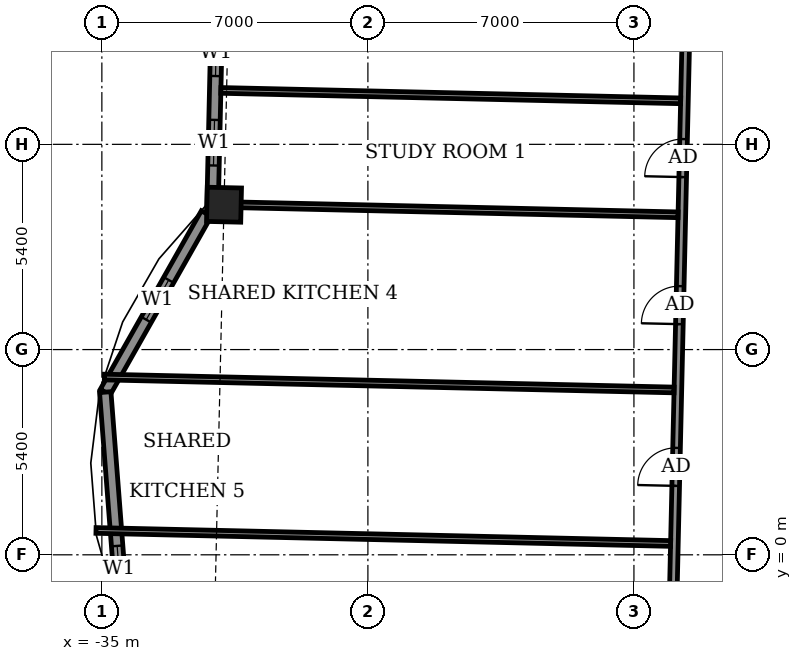
"""IFC4 building model, lengths in metres.
Left out: names, types, materials, properties, quantities, classifications, styles, units other than length and angle.
Written with IfcOpenShell. Run it as: python <this file> out.ifc"""

import sys

from ifc_helpers import new_model, si_unit, direction, frame, frame_2d, origin, origin_2d, place, context, subcontext, project, spatial, rectangle, extrude, element, fill, save


model = new_model("IFC4")
c1 = context("Model", 3, precision=1e-05, world=origin(), true_north=direction((0.0, 1.0)))
c2 = subcontext(c1, "Body", "Model", "MODEL_VIEW")
j1 = project(units=[si_unit("LENGTHUNIT", "METRE"), si_unit("PLANEANGLEUNIT", "RADIAN")], contexts=[c1])
p1 = place(None, origin())
s1 = spatial("IfcSite", under=j1, at=p1, CompositionType="ELEMENT")
p2 = place(p1, origin())
s2 = spatial("IfcBuilding", under=s1, at=p2, CompositionType="ELEMENT")
p3 = place(p2, frame((0.0, 0.0, 313.3)))
s3 = spatial("IfcBuildingStorey", under=s2, at=p3, CompositionType="ELEMENT", Elevation=313.3)
p4 = place(p3, frame((-31.786, 9.212, -0.55), z_axis=(0.0, 0.0, 1.0), x_axis=(-0.022680668131, -0.999742760561, 0.0)))
e1 = element("IfcColumn", 1, at=p4, inside=s3, PredefinedType="COLUMN", context=c2, shape_type="SweptSolid", body=[
    extrude(rectangle(XDim=0.9, YDim=0.9, at=origin_2d()), origin(), (0.0, 0.0, 1.0), 3.6),
])
p5 = place(p3, frame((-31.735, 24.69, 0.0), z_axis=(0.0, 0.0, 1.0), x_axis=(-0.022694199758, -0.999742453484, 0.0)))
e2 = element("IfcWall", 2, at=p5, inside=s3, PredefinedType="SOLIDWALL", context=c2, shape_type="SweptSolid", body=[
    extrude(rectangle(XDim=15.9, YDim=0.3, at=frame_2d((7.95, 0.0))), origin(), (0.0, 0.0, 1.0), 2.55),
])
p6 = place(p5, frame((1.953, 0.0, 0.0)))
e3 = element("IfcOpeningElement", 3, at=p6, cuts=e2, PredefinedType="OPENING", context=c2, shape_type="SweptSolid", body=[
    extrude(rectangle(XDim=1.5, YDim=2.4, at=frame_2d((0.75, 1.2))), frame((0.0, 0.16, 0.0), z_axis=(0.0, -1.0, 0.0), x_axis=(1.0, 0.0, 0.0)), (0.0, 0.0, 1.0), 0.32),
])
p7 = place(p5, frame((10.896, 0.0, 0.9)))
e4 = element("IfcOpeningElement", 4, at=p7, cuts=e2, PredefinedType="OPENING", context=c2, shape_type="SweptSolid", body=[
    extrude(rectangle(XDim=1.2, YDim=1.5, at=frame_2d((0.6, 0.75))), frame((0.0, 0.16, 0.0), z_axis=(0.0, -1.0, 0.0), x_axis=(1.0, 0.0, 0.0)), (0.0, 0.0, 1.0), 0.32),
])
p8 = place(p5, frame((13.25, 0.0, 0.9)))
e5 = element("IfcOpeningElement", 5, at=p8, cuts=e2, PredefinedType="OPENING", context=c2, shape_type="SweptSolid", body=[
    extrude(rectangle(XDim=1.2, YDim=1.5, at=frame_2d((0.6, 0.75))), frame((0.0, 0.16, 0.0), z_axis=(0.0, -1.0, 0.0), x_axis=(1.0, 0.0, 0.0)), (0.0, 0.0, 1.0), 0.32),
])
p9 = place(p3, frame((-32.252, 8.978, 0.0), z_axis=(0.0, 0.0, 1.0), x_axis=(-0.492554919955, -0.870281363025, 0.0)))
e6 = element("IfcWall", 6, at=p9, inside=s3, PredefinedType="SOLIDWALL", context=c2, shape_type="SweptSolid", body=[
    extrude(rectangle(XDim=5.398, YDim=0.3, at=frame_2d((2.699, 0.0))), origin(), (0.0, 0.0, 1.0), 3.05),
])
p10 = place(p9, frame((2.008, 0.0, 0.9)))
e7 = element("IfcOpeningElement", 7, at=p10, cuts=e6, PredefinedType="OPENING", context=c2, shape_type="SweptSolid", body=[
    extrude(rectangle(XDim=1.2, YDim=1.5, at=frame_2d((0.6, 0.75))), frame((0.0, 0.16, 0.0), z_axis=(0.0, -1.0, 0.0), x_axis=(1.0, 0.0, 0.0)), (0.0, 0.0, 1.0), 0.32),
])
p11 = place(p3, frame((-34.911, 4.28, 0.0), z_axis=(0.0, 0.0, 1.0), x_axis=(0.077135284219, -0.997020635658, 0.0)))
e8 = element("IfcWall", 8, at=p11, inside=s3, PredefinedType="SOLIDWALL", context=c2, shape_type="SweptSolid", body=[
    extrude(rectangle(XDim=5.574, YDim=0.3, at=frame_2d((2.787, 0.0))), origin(), (0.0, 0.0, 1.0), 3.05),
])
p12 = place(p11, frame((4.058, 0.0, 0.9)))
e9 = element("IfcOpeningElement", 9, at=p12, cuts=e8, PredefinedType="OPENING", context=c2, shape_type="SweptSolid", body=[
    extrude(rectangle(XDim=1.2, YDim=1.5, at=frame_2d((0.6, 0.75))), frame((0.0, 0.16, 0.0), z_axis=(0.0, -1.0, 0.0), x_axis=(1.0, 0.0, 0.0)), (0.0, 0.0, 1.0), 0.32),
])
p13 = place(p3, frame((-34.78, 12.406, 0.0), z_axis=(0.0, 0.0, 1.0), x_axis=(0.022828630714, 0.999739392852, 0.0)))
e10 = element("IfcWall", 10, at=p13, inside=s3, PredefinedType="USERDEFINED", context=c2, shape_type="SweptSolid", body=[
    extrude(rectangle(XDim=6.0, YDim=0.55, at=frame_2d((3.0, 0.0))), origin(), (0.0, 0.0, 1.0), 0.8),
])
p14 = place(p3, frame((-20.216, -12.081, 0.0), z_axis=(0.0, 0.0, 1.0), x_axis=(0.02267447203, 0.999742901109, 0.0)))
e11 = element("IfcWall", 11, at=p14, inside=s3, PredefinedType="PARTITIONING", context=c2, shape_type="SweptSolid", body=[
    extrude(rectangle(XDim=27.65, YDim=0.2, at=frame_2d((13.825, 0.0))), origin(), (0.0, 0.0, 1.0), 3.05),
])
p15 = place(p14, frame((22.025, 0.0, 0.0)))
e12 = element("IfcOpeningElement", 12, at=p15, cuts=e11, PredefinedType="OPENING", context=c2, shape_type="SweptSolid", body=[
    extrude(rectangle(XDim=1.0, YDim=2.1, at=frame_2d((0.5, 1.05))), frame((0.0, 0.11, 0.0), z_axis=(0.0, -1.0, 0.0), x_axis=(1.0, 0.0, 0.0)), (0.0, 0.0, 1.0), 0.22),
])
p16 = place(p14, frame((18.155, 0.0, 0.0)))
e13 = element("IfcOpeningElement", 13, at=p16, cuts=e11, PredefinedType="OPENING", context=c2, shape_type="SweptSolid", body=[
    extrude(rectangle(XDim=1.0, YDim=2.1, at=frame_2d((0.5, 1.05))), frame((0.0, 0.11, 0.0), z_axis=(0.0, -1.0, 0.0), x_axis=(1.0, 0.0, 0.0)), (0.0, 0.0, 1.0), 0.22),
])
p17 = place(p14, frame((13.898, 0.0, 0.0)))
e14 = element("IfcOpeningElement", 14, at=p17, cuts=e11, PredefinedType="OPENING", context=c2, shape_type="SweptSolid", body=[
    extrude(rectangle(XDim=1.0, YDim=2.1, at=frame_2d((0.5, 1.05))), frame((0.0, 0.11, 0.0), z_axis=(0.0, -1.0, 0.0), x_axis=(1.0, 0.0, 0.0)), (0.0, 0.0, 1.0), 0.22),
])
p18 = place(p14, frame((9.405, 0.0, 0.0)))
e15 = element("IfcOpeningElement", 15, at=p18, cuts=e11, PredefinedType="OPENING", context=c2, shape_type="SweptSolid", body=[
    extrude(rectangle(XDim=1.0, YDim=2.1, at=frame_2d((0.5, 1.05))), frame((0.0, 0.11, 0.0), z_axis=(0.0, -1.0, 0.0), x_axis=(1.0, 0.0, 0.0)), (0.0, 0.0, 1.0), 0.22),
])
p19 = place(p14, frame((5.837, 0.0, 0.0)))
e16 = element("IfcOpeningElement", 16, at=p19, cuts=e11, PredefinedType="OPENING", context=c2, shape_type="SweptSolid", body=[
    extrude(rectangle(XDim=1.0, YDim=2.1, at=frame_2d((0.5, 1.05))), frame((0.0, 0.11, 0.0), z_axis=(0.0, -1.0, 0.0), x_axis=(1.0, 0.0, 0.0)), (0.0, 0.0, 1.0), 0.22),
])
p20 = place(p14, frame((3.75, 0.0, 0.0)))
e17 = element("IfcOpeningElement", 17, at=p20, cuts=e11, PredefinedType="OPENING", context=c2, shape_type="SweptSolid", body=[
    extrude(rectangle(XDim=0.9, YDim=2.1, at=frame_2d((0.45, 1.05))), frame((0.0, 0.11, 0.0), z_axis=(0.0, -1.0, 0.0), x_axis=(1.0, 0.0, 0.0)), (0.0, 0.0, 1.0), 0.22),
])
p21 = place(p3, frame((-35.154, 0.641, 0.0), z_axis=(0.0, 0.0, 1.0), x_axis=(0.99974273487, -0.022681800518, 0.0)))
e18 = element("IfcWall", 18, at=p21, inside=s3, PredefinedType="PARTITIONING", context=c2, shape_type="SweptSolid", body=[
    extrude(rectangle(XDim=15.123, YDim=0.15, at=frame_2d((7.562, 0.0))), origin(), (0.0, 0.0, 1.0), 2.05),
])
p22 = place(p3, frame((-34.934, 4.677, 0.0), z_axis=(0.0, 0.0, 1.0), x_axis=(0.99974273422, -0.022681829163, 0.0)))
e19 = element("IfcWall", 19, at=p22, inside=s3, PredefinedType="PARTITIONING", context=c2, shape_type="SweptSolid", body=[
    extrude(rectangle(XDim=14.994, YDim=0.15, at=frame_2d((7.497, 0.0))), origin(), (0.0, 0.0, 1.0), 2.05),
])
p23 = place(p3, frame((-31.936, 9.22, 0.0), z_axis=(0.0, 0.0, 1.0), x_axis=(0.9997437175, -0.02263844782, 0.0)))
e20 = element("IfcWall", 20, at=p23, inside=s3, PredefinedType="PARTITIONING", context=c2, shape_type="SweptSolid", body=[
    extrude(rectangle(XDim=12.1, YDim=0.15, at=frame_2d((6.05, 0.0))), origin(), (0.0, 0.0, 1.0), 3.05),
])
p24 = place(p3, frame((-31.868, 12.219, 0.0), z_axis=(0.0, 0.0, 1.0), x_axis=(0.9997437175, -0.02263844782, 0.0)))
e21 = element("IfcWall", 21, at=p24, inside=s3, PredefinedType="PARTITIONING", context=c2, shape_type="SweptSolid", body=[
    extrude(rectangle(XDim=12.1, YDim=0.15, at=frame_2d((6.05, 0.0))), origin(), (0.0, 0.0, 1.0), 2.55),
])
p25 = place(p7, origin())
e22 = element("IfcWindow", 22, at=p25, inside=s3, PartitioningType="SINGLE_PANEL", PredefinedType="WINDOW", context=c2, shape_type="SweptSolid", body=[
    extrude(rectangle(XDim=1.2, YDim=1.5, at=frame_2d((0.6, 0.75))), frame((0.0, 0.03, 0.0), z_axis=(0.0, -1.0, 0.0), x_axis=(1.0, 0.0, 0.0)), (0.0, 0.0, 1.0), 0.06),
])
fill(e4, e22)
p26 = place(p8, origin())
e23 = element("IfcWindow", 23, at=p26, inside=s3, PartitioningType="SINGLE_PANEL", PredefinedType="WINDOW", context=c2, shape_type="SweptSolid", body=[
    extrude(rectangle(XDim=1.2, YDim=1.5, at=frame_2d((0.6, 0.75))), frame((0.0, 0.03, 0.0), z_axis=(0.0, -1.0, 0.0), x_axis=(1.0, 0.0, 0.0)), (0.0, 0.0, 1.0), 0.06),
])
fill(e5, e23)
p27 = place(p10, origin())
e24 = element("IfcWindow", 24, at=p27, inside=s3, PartitioningType="SINGLE_PANEL", PredefinedType="WINDOW", context=c2, shape_type="SweptSolid", body=[
    extrude(rectangle(XDim=1.2, YDim=1.5, at=frame_2d((0.6, 0.75))), frame((0.0, 0.03, 0.0), z_axis=(0.0, -1.0, 0.0), x_axis=(1.0, 0.0, 0.0)), (0.0, 0.0, 1.0), 0.06),
])
fill(e7, e24)
p28 = place(p12, origin())
e25 = element("IfcWindow", 25, at=p28, inside=s3, PartitioningType="SINGLE_PANEL", PredefinedType="WINDOW", context=c2, shape_type="SweptSolid", body=[
    extrude(rectangle(XDim=1.2, YDim=1.5, at=frame_2d((0.6, 0.75))), frame((0.0, 0.03, 0.0), z_axis=(0.0, -1.0, 0.0), x_axis=(1.0, 0.0, 0.0)), (0.0, 0.0, 1.0), 0.06),
])
fill(e9, e25)
p29 = place(p15, origin())
e26 = element("IfcDoor", 26, at=p29, inside=s3, OperationType="SINGLE_SWING_RIGHT", PredefinedType="DOOR", context=c2, shape_type="SweptSolid", body=[
    extrude(rectangle(XDim=1.0, YDim=2.1, at=frame_2d((0.5, 1.05))), frame((0.0, 0.025, 0.0), z_axis=(0.0, -1.0, 0.0), x_axis=(1.0, 0.0, 0.0)), (0.0, 0.0, 1.0), 0.05),
])
fill(e12, e26)
p30 = place(p16, origin())
e27 = element("IfcDoor", 27, at=p30, inside=s3, OperationType="SINGLE_SWING_LEFT", PredefinedType="DOOR", context=c2, shape_type="SweptSolid", body=[
    extrude(rectangle(XDim=1.0, YDim=2.1, at=frame_2d((0.5, 1.05))), frame((0.0, 0.025, 0.0), z_axis=(0.0, -1.0, 0.0), x_axis=(1.0, 0.0, 0.0)), (0.0, 0.0, 1.0), 0.05),
])
fill(e13, e27)
p31 = place(p17, origin())
e28 = element("IfcDoor", 28, at=p31, inside=s3, OperationType="SINGLE_SWING_RIGHT", PredefinedType="DOOR", context=c2, shape_type="SweptSolid", body=[
    extrude(rectangle(XDim=1.0, YDim=2.1, at=frame_2d((0.5, 1.05))), frame((0.0, 0.025, 0.0), z_axis=(0.0, -1.0, 0.0), x_axis=(1.0, 0.0, 0.0)), (0.0, 0.0, 1.0), 0.05),
])
fill(e14, e28)
save(model, sys.argv[1])
